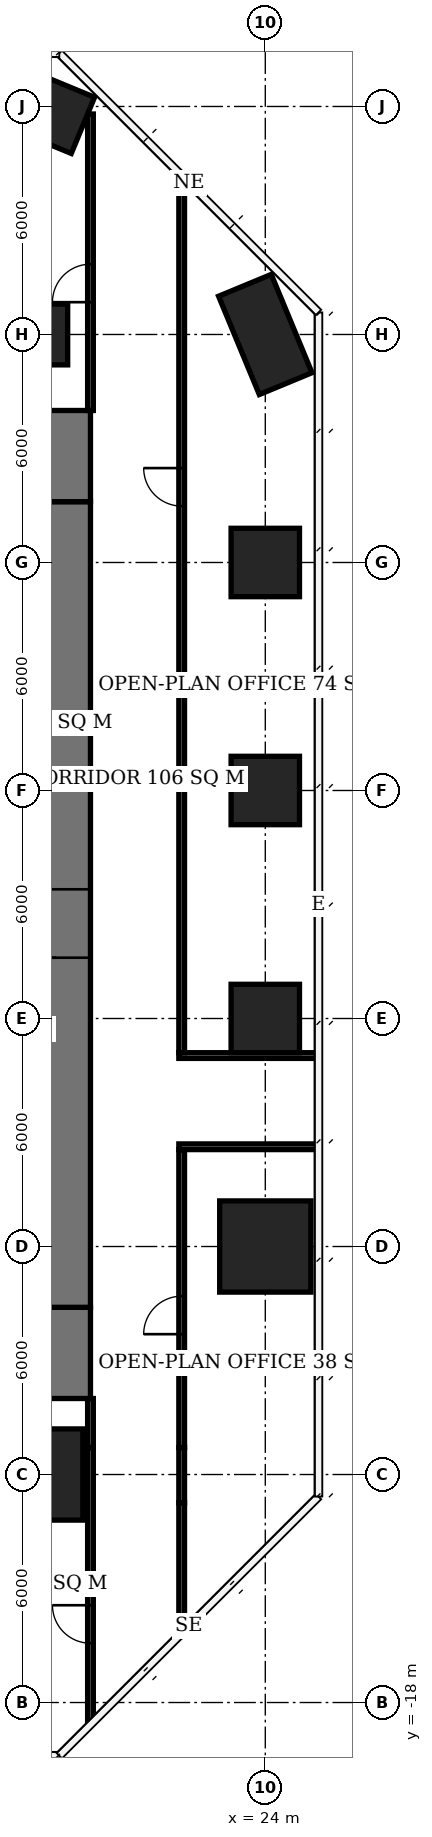
"""IFC4 building model, lengths in metres.
Left out: names, types, materials, properties, quantities, classifications, styles, units other than length and angle.
Written with IfcOpenShell. Run it as: python <this file> out.ifc"""

import sys

from ifc_helpers import new_model, si_unit, direction, frame, frame_2d, origin, origin_2d, place, context, subcontext, project, spatial, rectangle, extrude, element, fill, save


model = new_model("IFC4")
c1 = context("Model", 3, precision=1e-05, world=origin(), true_north=direction((0.0, 1.0)))
c2 = subcontext(c1, "Body", "Model", "MODEL_VIEW")
j1 = project(units=[si_unit("LENGTHUNIT", "METRE"), si_unit("PLANEANGLEUNIT", "RADIAN")], contexts=[c1])
p1 = place(None, origin())
s1 = spatial("IfcSite", under=j1, at=p1, CompositionType="ELEMENT")
p2 = place(p1, origin())
s2 = spatial("IfcBuilding", under=s1, at=p2, CompositionType="ELEMENT")
p3 = place(p2, frame((0.0, 0.0, 121.1)))
s3 = spatial("IfcBuildingStorey", under=s2, at=p3, CompositionType="ELEMENT", Elevation=121.1)
p4 = place(p3, frame((18.0, -12.0, 0.0), z_axis=(0.0, 0.0, 1.0), x_axis=(1.0, 0.0, 0.0)))
e1 = element("IfcColumn", 1, at=p4, inside=s3, PredefinedType="COLUMN", context=c2, shape_type="SweptSolid", body=[
    extrude(rectangle(XDim=2.4, YDim=2.4, at=origin_2d()), origin(), (0.0, 0.0, 1.0), 3.9),
])
p5 = place(p3, frame((18.0, 18.0, 0.0), z_axis=(0.0, 0.0, 1.0), x_axis=(1.0, 0.0, 0.0)))
e2 = element("IfcColumn", 2, at=p5, inside=s3, PredefinedType="COLUMN", context=c2, shape_type="SweptSolid", body=[
    extrude(rectangle(XDim=1.6, YDim=1.6, at=origin_2d()), origin(), (0.0, 0.0, 1.0), 3.9),
])
p6 = place(p3, frame((18.0, 24.0, 0.0), z_axis=(0.0, 0.0, 1.0), x_axis=(0.923879532511, -0.382683432365, 0.0)))
e3 = element("IfcColumn", 3, at=p6, inside=s3, PredefinedType="COLUMN", context=c2, shape_type="SweptSolid", body=[
    extrude(rectangle(XDim=2.6, YDim=1.6, at=origin_2d()), origin(), (0.0, 0.0, 1.0), 3.9),
])
p7 = place(p3, frame((24.0, -6.0, 0.0), z_axis=(0.0, 0.0, 1.0), x_axis=(1.0, 0.0, 0.0)))
e4 = element("IfcColumn", 4, at=p7, inside=s3, PredefinedType="COLUMN", context=c2, shape_type="SweptSolid", body=[
    extrude(rectangle(XDim=2.4, YDim=2.4, at=origin_2d()), origin(), (0.0, 0.0, 1.0), 3.9),
])
for number, where, z_axis, x_axis in (
    (5, (24.0, 0.0, 0.0), (0.0, 0.0, 1.0), (1.0, 0.0, 0.0)),
    (6, (24.0, 6.0, 0.0), (0.0, 0.0, 1.0), (1.0, 0.0, 0.0)),
    (7, (24.0, 12.0, 0.0), (0.0, 0.0, 1.0), (1.0, 0.0, 0.0)),
):
    element("IfcColumn", number, at=place(p3, frame(where, z_axis=z_axis, x_axis=x_axis)), inside=s3, PredefinedType="COLUMN", context=c2, shape_type="SweptSolid", body=[
        extrude(rectangle(XDim=1.8, YDim=1.8, at=origin_2d()), origin(), (0.0, 0.0, 1.0), 3.9),
    ])
p8 = place(p3, frame((24.0, 18.0, 0.0), z_axis=(0.0, 0.0, 1.0), x_axis=(0.382683432365, -0.923879532511, 0.0)))
e8 = element("IfcColumn", 8, at=p8, inside=s3, PredefinedType="COLUMN", context=c2, shape_type="SweptSolid", body=[
    extrude(rectangle(XDim=2.8, YDim=1.5, at=origin_2d()), origin(), (0.0, 0.0, 1.0), 3.9),
])
p9 = place(p3, frame((18.5, -7.6, 0.0), z_axis=(0.0, 0.0, 1.0), x_axis=(0.0, 1.0, 0.0)))
e9 = element("IfcWall", 9, at=p9, inside=s3, PredefinedType="SHEAR", context=c2, shape_type="SweptSolid", body=[
    extrude(rectangle(XDim=21.2, YDim=1.8, at=frame_2d((10.6, 0.0))), origin(), (0.0, 0.0, 1.0), 3.9),
])
p10 = place(p9, frame((9.2, 0.0, 0.0)))
e10 = element("IfcOpeningElement", 10, at=p10, cuts=e9, PredefinedType="OPENING", context=c2, shape_type="SweptSolid", body=[
    extrude(rectangle(XDim=1.8, YDim=2.4, at=frame_2d((0.9, 1.2))), frame((0.0, 0.91, 0.0), z_axis=(0.0, -1.0, 0.0), x_axis=(1.0, 0.0, 0.0)), (0.0, 0.0, 1.0), 1.82),
])
for number, where, z_axis, x_axis in (
    (11, (18.5, -10.0, 0.0), (0.0, 0.0, 1.0), (0.0, 1.0, 0.0)),
    (12, (18.5, 13.6, 0.0), (0.0, 0.0, 1.0), (0.0, 1.0, 0.0)),
):
    element("IfcWall", number, at=place(p3, frame(where, z_axis=z_axis, x_axis=x_axis)), inside=s3, PredefinedType="SHEAR", context=c2, shape_type="SweptSolid", body=[
        extrude(rectangle(XDim=2.4, YDim=1.8, at=frame_2d((1.2, 0.0))), origin(), (0.0, 0.0, 1.0), 3.9),
    ])
p11 = place(p3, frame((19.4, -18.489, 0.0), z_axis=(0.0, 0.0, 1.0), x_axis=(0.0, 1.0, 0.0)))
e13 = element("IfcWall", 13, at=p11, inside=s3, PredefinedType="PARTITIONING", context=c2, shape_type="SweptSolid", body=[
    extrude(rectangle(XDim=3.349, YDim=0.15, at=frame_2d((1.675, 0.0))), origin(), (0.0, 0.0, 1.0), 3.65),
])
p12 = place(p11, frame((2.049, 0.0, 0.0)))
e14 = element("IfcOpeningElement", 14, at=p12, cuts=e13, PredefinedType="OPENING", context=c2, shape_type="SweptSolid", body=[
    extrude(rectangle(XDim=1.0, YDim=2.1, at=frame_2d((0.5, 1.05))), frame((0.0, 0.085, 0.0), z_axis=(0.0, -1.0, 0.0), x_axis=(1.0, 0.0, 0.0)), (0.0, 0.0, 1.0), 0.17),
])
p13 = place(p3, frame((19.4, -15.14, 0.0), z_axis=(0.0, 0.0, 1.0), x_axis=(0.0, 1.0, 0.0)))
e15 = element("IfcWall", 15, at=p13, inside=s3, PredefinedType="PARTITIONING", context=c2, shape_type="SweptSolid", body=[
    extrude(rectangle(XDim=3.85, YDim=0.15, at=frame_2d((1.925, 0.0))), origin(), (0.0, 0.0, 1.0), 2.65),
])
p14 = place(p3, frame((19.4, -11.29, 0.0), z_axis=(0.0, 0.0, 1.0), x_axis=(0.0, 1.0, 0.0)))
e16 = element("IfcWall", 16, at=p14, inside=s3, PredefinedType="PARTITIONING", context=c2, shape_type="SweptSolid", body=[
    extrude(rectangle(XDim=1.29, YDim=0.15, at=frame_2d((0.645, 0.0))), origin(), (0.0, 0.0, 1.0), 3.65),
])
p15 = place(p3, frame((19.4, 16.0, 0.0), z_axis=(0.0, 0.0, 1.0), x_axis=(0.0, 1.0, 0.0)))
e17 = element("IfcWall", 17, at=p15, inside=s3, PredefinedType="PARTITIONING", context=c2, shape_type="SweptSolid", body=[
    extrude(rectangle(XDim=7.802, YDim=0.15, at=frame_2d((3.901, 0.0))), origin(), (0.0, 0.0, 1.0), 3.65),
])
p16 = place(p15, frame((2.85, 0.0, 0.0)))
e18 = element("IfcOpeningElement", 18, at=p16, cuts=e17, PredefinedType="OPENING", context=c2, shape_type="SweptSolid", body=[
    extrude(rectangle(XDim=1.0, YDim=2.1, at=frame_2d((0.5, 1.05))), frame((0.0, 0.085, 0.0), z_axis=(0.0, -1.0, 0.0), x_axis=(1.0, 0.0, 0.0)), (0.0, 0.0, 1.0), 0.17),
])
p17 = place(p3, frame((21.8, -16.089, 0.0), z_axis=(0.0, 0.0, 1.0), x_axis=(0.0, 1.0, 0.0)))
e19 = element("IfcWall", 19, at=p17, inside=s3, PredefinedType="PARTITIONING", context=c2, shape_type="SweptSolid", body=[
    extrude(rectangle(XDim=3.349, YDim=0.15, at=frame_2d((1.675, 0.0))), origin(), (0.0, 0.0, 1.0), 3.65),
])
p18 = place(p3, frame((21.8, -12.74, 0.0), z_axis=(0.0, 0.0, 1.0), x_axis=(0.0, 1.0, 0.0)))
e20 = element("IfcWall", 20, at=p18, inside=s3, PredefinedType="PARTITIONING", context=c2, shape_type="SweptSolid", body=[
    extrude(rectangle(XDim=1.45, YDim=0.15, at=frame_2d((0.725, 0.0))), origin(), (0.0, 0.0, 1.0), 2.65),
])
p19 = place(p3, frame((21.8, -11.29, 0.0), z_axis=(0.0, 0.0, 1.0), x_axis=(0.0, 1.0, 0.0)))
e21 = element("IfcWall", 21, at=p19, inside=s3, PredefinedType="PARTITIONING", context=c2, shape_type="SweptSolid", body=[
    extrude(rectangle(XDim=7.84, YDim=0.15, at=frame_2d((3.92, 0.0))), origin(), (0.0, 0.0, 1.0), 3.65),
])
p20 = place(p19, frame((2.983, 0.0, 0.0)))
e22 = element("IfcOpeningElement", 22, at=p20, cuts=e21, PredefinedType="OPENING", context=c2, shape_type="SweptSolid", body=[
    extrude(rectangle(XDim=1.0, YDim=2.1, at=frame_2d((0.5, 1.05))), frame((0.0, 0.085, 0.0), z_axis=(0.0, -1.0, 0.0), x_axis=(1.0, 0.0, 0.0)), (0.0, 0.0, 1.0), 0.17),
])
p21 = place(p3, frame((21.725, -3.375, 0.0), z_axis=(0.0, 0.0, 1.0), x_axis=(1.0, 0.0, 0.0)))
e23 = element("IfcWall", 23, at=p21, inside=s3, PredefinedType="PARTITIONING", context=c2, shape_type="SweptSolid", body=[
    extrude(rectangle(XDim=3.625, YDim=0.15, at=frame_2d((1.812, 0.0))), origin(), (0.0, 0.0, 1.0), 3.65),
])
p22 = place(p3, frame((21.8, -0.9, 0.0), z_axis=(0.0, 0.0, 1.0), x_axis=(0.0, 1.0, 0.0)))
e24 = element("IfcWall", 24, at=p22, inside=s3, PredefinedType="PARTITIONING", context=c2, shape_type="SweptSolid", body=[
    extrude(rectangle(XDim=22.989, YDim=0.15, at=frame_2d((11.495, 0.0))), origin(), (0.0, 0.0, 1.0), 3.65),
])
p23 = place(p22, frame((14.384, 0.0, 0.0)))
e25 = element("IfcOpeningElement", 25, at=p23, cuts=e24, PredefinedType="OPENING", context=c2, shape_type="SweptSolid", body=[
    extrude(rectangle(XDim=1.0, YDim=2.1, at=frame_2d((0.5, 1.05))), frame((0.0, 0.085, 0.0), z_axis=(0.0, -1.0, 0.0), x_axis=(1.0, 0.0, 0.0)), (0.0, 0.0, 1.0), 0.17),
])
p24 = place(p3, frame((21.725, -0.975, 0.0), z_axis=(0.0, 0.0, 1.0), x_axis=(1.0, 0.0, 0.0)))
e26 = element("IfcWall", 26, at=p24, inside=s3, PredefinedType="PARTITIONING", context=c2, shape_type="SweptSolid", body=[
    extrude(rectangle(XDim=3.675, YDim=0.15, at=frame_2d((1.837, 0.0))), origin(), (0.0, 0.0, 1.0), 3.65),
])
p25 = place(p10, origin())
e27 = element("IfcDoor", 27, at=p25, inside=s3, OperationType="DOUBLE_DOOR_SINGLE_SWING", PredefinedType="DOOR", context=c2, shape_type="SweptSolid", body=[
    extrude(rectangle(XDim=1.8, YDim=2.4, at=frame_2d((0.9, 1.2))), frame((0.0, 0.025, 0.0), z_axis=(0.0, -1.0, 0.0), x_axis=(1.0, 0.0, 0.0)), (0.0, 0.0, 1.0), 0.05),
])
fill(e10, e27)
p26 = place(p12, origin())
e28 = element("IfcDoor", 28, at=p26, inside=s3, OperationType="SINGLE_SWING_RIGHT", PredefinedType="DOOR", context=c2, shape_type="SweptSolid", body=[
    extrude(rectangle(XDim=1.0, YDim=2.1, at=frame_2d((0.5, 1.05))), frame((0.0, 0.025, 0.0), z_axis=(0.0, -1.0, 0.0), x_axis=(1.0, 0.0, 0.0)), (0.0, 0.0, 1.0), 0.05),
])
fill(e14, e28)
p27 = place(p20, origin())
e29 = element("IfcDoor", 29, at=p27, inside=s3, OperationType="SINGLE_SWING_LEFT", PredefinedType="DOOR", context=c2, shape_type="SweptSolid", body=[
    extrude(rectangle(XDim=1.0, YDim=2.1, at=frame_2d((0.5, 1.05))), frame((0.0, 0.025, 0.0), z_axis=(0.0, -1.0, 0.0), x_axis=(1.0, 0.0, 0.0)), (0.0, 0.0, 1.0), 0.05),
])
fill(e22, e29)
p28 = place(p23, origin())
e30 = element("IfcDoor", 30, at=p28, inside=s3, OperationType="SINGLE_SWING_RIGHT", PredefinedType="DOOR", context=c2, shape_type="SweptSolid", body=[
    extrude(rectangle(XDim=1.0, YDim=2.1, at=frame_2d((0.5, 1.05))), frame((0.0, 0.025, 0.0), z_axis=(0.0, -1.0, 0.0), x_axis=(1.0, 0.0, 0.0)), (0.0, 0.0, 1.0), 0.05),
])
fill(e25, e30)
p29 = place(p16, origin())
e31 = element("IfcDoor", 31, at=p29, inside=s3, OperationType="SINGLE_SWING_LEFT", PredefinedType="DOOR", context=c2, shape_type="SweptSolid", body=[
    extrude(rectangle(XDim=1.0, YDim=2.1, at=frame_2d((0.5, 1.05))), frame((0.0, 0.025, 0.0), z_axis=(0.0, -1.0, 0.0), x_axis=(1.0, 0.0, 0.0)), (0.0, 0.0, 1.0), 0.05),
])
fill(e18, e31)
save(model, sys.argv[1])
